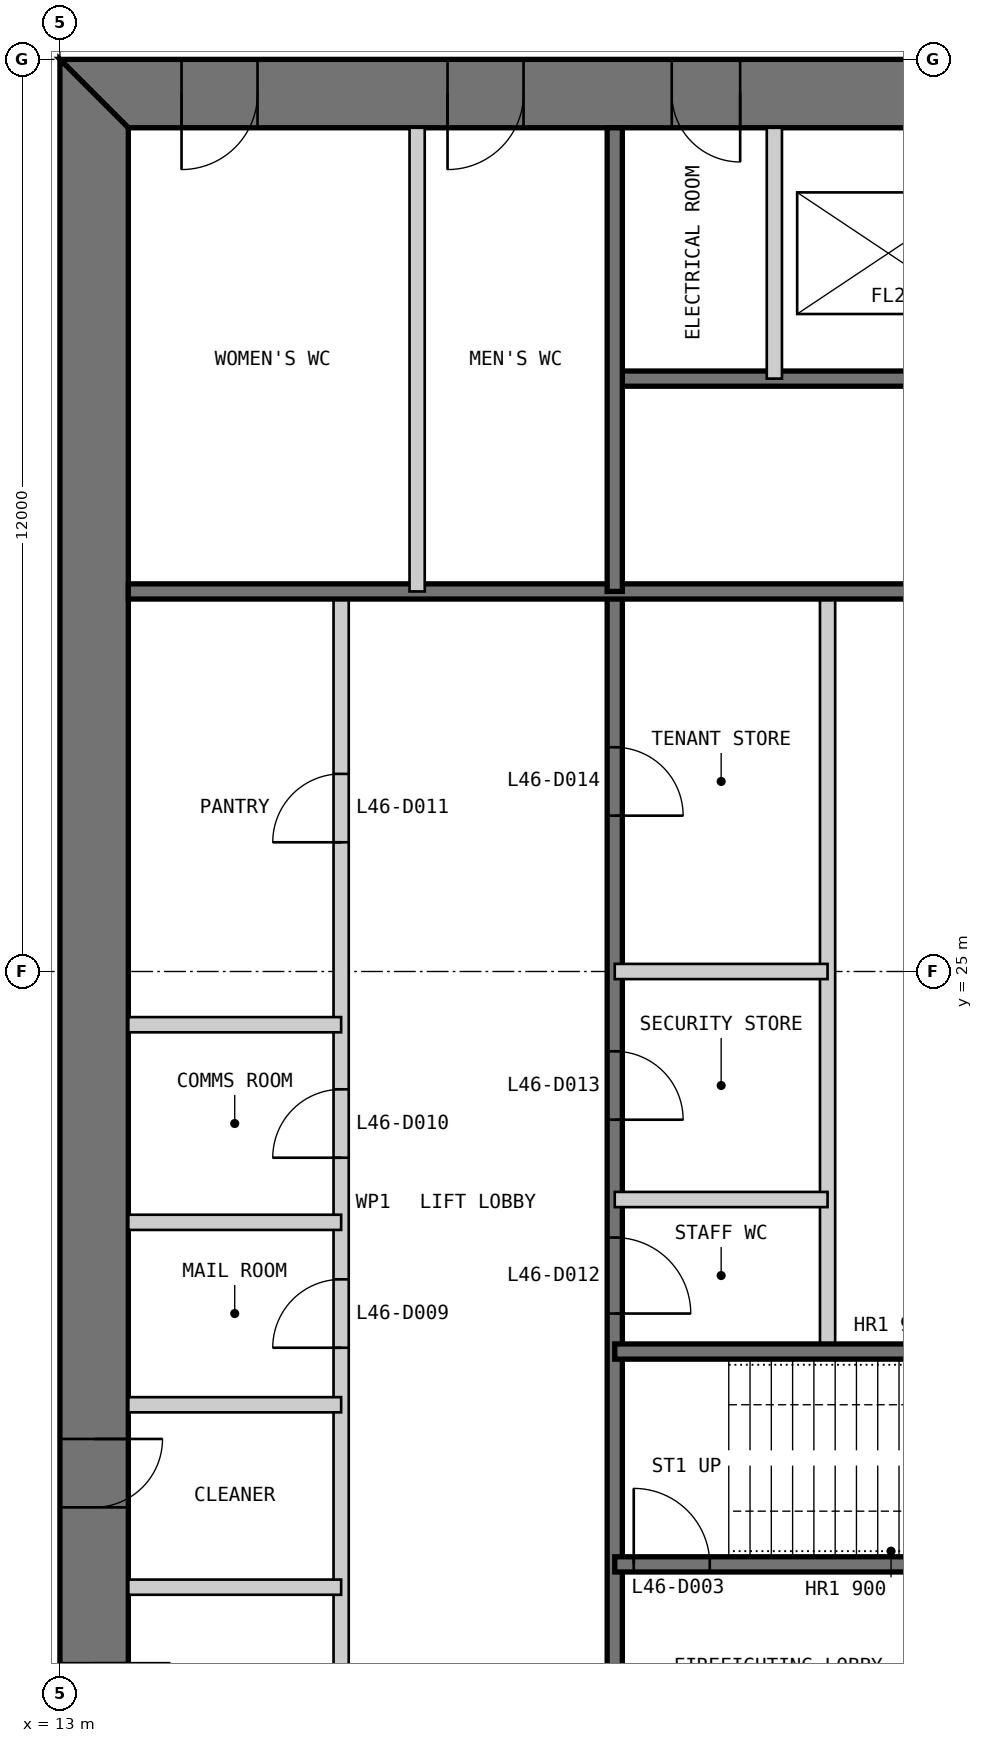
"""IFC4 building model, lengths in metres.
Left out: names, types, materials, properties, quantities, classifications, styles, units other than length and angle.
Written with IfcOpenShell. Run it as: python <this file> out.ifc"""

import sys

from ifc_helpers import new_model, si_unit, direction, frame, frame_2d, origin, place, context, subcontext, project, spatial, polyline, rectangle, outline, extrude, element, fill, save


model = new_model("IFC4")
c1 = context("Model", 3, precision=1e-05, world=origin(), true_north=direction((0.0, 1.0)))
c2 = subcontext(c1, "Body", "Model", "MODEL_VIEW")
j1 = project(units=[si_unit("LENGTHUNIT", "METRE"), si_unit("PLANEANGLEUNIT", "RADIAN")], contexts=[c1])
p1 = place(None, origin())
s1 = spatial("IfcSite", under=j1, at=p1, CompositionType="ELEMENT")
p2 = place(p1, origin())
s2 = spatial("IfcBuilding", under=s1, at=p2, CompositionType="ELEMENT")
p3 = place(p2, frame((0.0, 0.0, 197.8)))
s3 = spatial("IfcBuildingStorey", under=s2, at=p3, CompositionType="ELEMENT", Elevation=197.8)
p4 = place(p3, frame((37.0, 36.55, 0.0), z_axis=(0.0, 0.0, 1.0), x_axis=(-1.0, 0.0, 0.0)))
e1 = element("IfcWall", 1, at=p4, inside=s3, PredefinedType="SHEAR", context=c2, shape_type="SweptSolid", body=[
    extrude(outline(polyline([(0.0, -0.45), (24.0, -0.45), (23.1, 0.45), (0.9, 0.45), (0.0, -0.45)])), origin(), (0.0, 0.0, 1.0), 4.0),
])
p5 = place(p4, frame((4.9, 0.0, 0.0)))
e2 = element("IfcOpeningElement", 2, at=p5, cuts=e1, PredefinedType="OPENING", context=c2, shape_type="SweptSolid", body=[
    extrude(rectangle(XDim=1.0, YDim=2.2, at=frame_2d((0.5, 1.1))), frame((0.0, 0.46, 0.0), z_axis=(0.0, -1.0, 0.0), x_axis=(1.0, 0.0, 0.0)), (0.0, 0.0, 1.0), 0.92),
])
p6 = place(p4, frame((8.9, 0.0, 0.0)))
e3 = element("IfcOpeningElement", 3, at=p6, cuts=e1, PredefinedType="OPENING", context=c2, shape_type="SweptSolid", body=[
    extrude(rectangle(XDim=1.1, YDim=2.2, at=frame_2d((0.55, 1.1))), frame((0.0, 0.46, 0.0), z_axis=(0.0, -1.0, 0.0), x_axis=(1.0, 0.0, 0.0)), (0.0, 0.0, 1.0), 0.92),
])
p7 = place(p4, frame((15.05, 0.0, 0.0)))
e4 = element("IfcOpeningElement", 4, at=p7, cuts=e1, PredefinedType="OPENING", context=c2, shape_type="SweptSolid", body=[
    extrude(rectangle(XDim=0.9, YDim=2.2, at=frame_2d((0.45, 1.1))), frame((0.0, 0.46, 0.0), z_axis=(0.0, -1.0, 0.0), x_axis=(1.0, 0.0, 0.0)), (0.0, 0.0, 1.0), 0.92),
])
p8 = place(p4, frame((17.9, 0.0, 0.0)))
e5 = element("IfcOpeningElement", 5, at=p8, cuts=e1, PredefinedType="OPENING", context=c2, shape_type="SweptSolid", body=[
    extrude(rectangle(XDim=1.0, YDim=2.2, at=frame_2d((0.5, 1.1))), frame((0.0, 0.46, 0.0), z_axis=(0.0, -1.0, 0.0), x_axis=(1.0, 0.0, 0.0)), (0.0, 0.0, 1.0), 0.92),
])
p9 = place(p4, frame((21.4, 0.0, 0.0)))
e6 = element("IfcOpeningElement", 6, at=p9, cuts=e1, PredefinedType="OPENING", context=c2, shape_type="SweptSolid", body=[
    extrude(rectangle(XDim=1.0, YDim=2.2, at=frame_2d((0.5, 1.1))), frame((0.0, 0.46, 0.0), z_axis=(0.0, -1.0, 0.0), x_axis=(1.0, 0.0, 0.0)), (0.0, 0.0, 1.0), 0.92),
])
p10 = place(p3, frame((13.45, 36.1, 0.0), z_axis=(0.0, 0.0, 1.0), x_axis=(0.0, -1.0, 0.0)))
e7 = element("IfcWall", 7, at=p10, inside=s3, PredefinedType="SHEAR", context=c2, shape_type="SweptSolid", body=[
    extrude(outline(polyline([(-0.9, -0.45), (23.1, -0.45), (22.2, 0.45), (0.0, 0.45), (-0.9, -0.45)])), origin(), (0.0, 0.0, 1.0), 4.0),
])
p11 = place(p10, frame((20.2, 0.0, 0.0)))
e8 = element("IfcOpeningElement", 8, at=p11, cuts=e7, PredefinedType="OPENING", context=c2, shape_type="SweptSolid", body=[
    extrude(rectangle(XDim=1.0, YDim=2.2, at=frame_2d((0.5, 1.1))), frame((0.0, 0.46, 0.0), z_axis=(0.0, -1.0, 0.0), x_axis=(1.0, 0.0, 0.0)), (0.0, 0.0, 1.0), 0.92),
])
p12 = place(p10, frame((17.25, 0.0, 0.0)))
e9 = element("IfcOpeningElement", 9, at=p12, cuts=e7, PredefinedType="OPENING", context=c2, shape_type="SweptSolid", body=[
    extrude(rectangle(XDim=0.9, YDim=2.2, at=frame_2d((0.45, 1.1))), frame((0.0, 0.46, 0.0), z_axis=(0.0, -1.0, 0.0), x_axis=(1.0, 0.0, 0.0)), (0.0, 0.0, 1.0), 0.92),
])
p13 = place(p3, frame((16.7, 13.9, 0.0), z_axis=(0.0, 0.0, 1.0), x_axis=(0.0, 1.0, 0.0)))
e10 = element("IfcWall", 10, at=p13, inside=s3, PredefinedType="PARTITIONING", context=c2, shape_type="SweptSolid", body=[
    extrude(rectangle(XDim=16.1, YDim=0.2, at=frame_2d((8.05, 0.0))), origin(), (0.0, 0.0, 1.0), 3.8),
])
p14 = place(p13, frame((6.15, 0.0, 0.0)))
e11 = element("IfcOpeningElement", 11, at=p14, cuts=e10, PredefinedType="OPENING", context=c2, shape_type="SweptSolid", body=[
    extrude(rectangle(XDim=0.9, YDim=2.2, at=frame_2d((0.45, 1.1))), frame((0.0, 0.11, 0.0), z_axis=(0.0, -1.0, 0.0), x_axis=(1.0, 0.0, 0.0)), (0.0, 0.0, 1.0), 0.22),
])
p15 = place(p13, frame((8.65, 0.0, 0.0)))
e12 = element("IfcOpeningElement", 12, at=p15, cuts=e10, PredefinedType="OPENING", context=c2, shape_type="SweptSolid", body=[
    extrude(rectangle(XDim=0.9, YDim=2.2, at=frame_2d((0.45, 1.1))), frame((0.0, 0.11, 0.0), z_axis=(0.0, -1.0, 0.0), x_axis=(1.0, 0.0, 0.0)), (0.0, 0.0, 1.0), 0.22),
])
p16 = place(p13, frame((12.8, 0.0, 0.0)))
e13 = element("IfcOpeningElement", 13, at=p16, cuts=e10, PredefinedType="OPENING", context=c2, shape_type="SweptSolid", body=[
    extrude(rectangle(XDim=0.9, YDim=2.2, at=frame_2d((0.45, 1.1))), frame((0.0, 0.11, 0.0), z_axis=(0.0, -1.0, 0.0), x_axis=(1.0, 0.0, 0.0)), (0.0, 0.0, 1.0), 0.22),
])
p17 = place(p3, frame((20.3, 13.9, 0.0), z_axis=(0.0, 0.0, 1.0), x_axis=(0.0, 1.0, 0.0)))
e14 = element("IfcWall", 14, at=p17, inside=s3, PredefinedType="SOLIDWALL", context=c2, shape_type="SweptSolid", body=[
    extrude(rectangle(XDim=16.1, YDim=0.2, at=frame_2d((8.05, 0.0))), origin(), (0.0, 0.0, 1.0), 3.8),
])
p18 = place(p17, frame((6.6, 0.0, 0.0)))
e15 = element("IfcOpeningElement", 15, at=p18, cuts=e14, PredefinedType="OPENING", context=c2, shape_type="SweptSolid", body=[
    extrude(rectangle(XDim=1.0, YDim=2.2, at=frame_2d((0.5, 1.1))), frame((0.0, 0.11, 0.0), z_axis=(0.0, -1.0, 0.0), x_axis=(1.0, 0.0, 0.0)), (0.0, 0.0, 1.0), 0.22),
])
p19 = place(p17, frame((9.15, 0.0, 0.0)))
e16 = element("IfcOpeningElement", 16, at=p19, cuts=e14, PredefinedType="OPENING", context=c2, shape_type="SweptSolid", body=[
    extrude(rectangle(XDim=0.9, YDim=2.2, at=frame_2d((0.45, 1.1))), frame((0.0, 0.11, 0.0), z_axis=(0.0, -1.0, 0.0), x_axis=(1.0, 0.0, 0.0)), (0.0, 0.0, 1.0), 0.22),
])
p20 = place(p17, frame((13.15, 0.0, 0.0)))
e17 = element("IfcOpeningElement", 17, at=p20, cuts=e14, PredefinedType="OPENING", context=c2, shape_type="SweptSolid", body=[
    extrude(rectangle(XDim=0.9, YDim=2.2, at=frame_2d((0.45, 1.1))), frame((0.0, 0.11, 0.0), z_axis=(0.0, -1.0, 0.0), x_axis=(1.0, 0.0, 0.0)), (0.0, 0.0, 1.0), 0.22),
])
p21 = place(p3, frame((23.1, 20.0, 0.0), z_axis=(0.0, 0.0, 1.0), x_axis=(0.0, 1.0, 0.0)))
e18 = element("IfcWall", 18, at=p21, inside=s3, PredefinedType="PARTITIONING", context=c2, shape_type="SweptSolid", body=[
    extrude(rectangle(XDim=10.0, YDim=0.2, at=frame_2d((5.0, 0.0))), origin(), (0.0, 0.0, 1.0), 3.8),
])
p22 = place(p3, frame((20.3, 17.2, 0.0), z_axis=(0.0, 0.0, 1.0), x_axis=(1.0, 0.0, 0.0)))
e19 = element("IfcWall", 19, at=p22, inside=s3, PredefinedType="SOLIDWALL", context=c2, shape_type="SweptSolid", body=[
    extrude(rectangle(XDim=9.4, YDim=0.2, at=frame_2d((4.7, 0.0))), origin(), (0.0, 0.0, 1.0), 3.8),
])
p23 = place(p22, frame((0.25, 0.0, 0.0)))
e20 = element("IfcOpeningElement", 20, at=p23, cuts=e19, PredefinedType="OPENING", context=c2, shape_type="SweptSolid", body=[
    extrude(rectangle(XDim=1.0, YDim=2.2, at=frame_2d((0.5, 1.1))), frame((0.0, 0.11, 0.0), z_axis=(0.0, -1.0, 0.0), x_axis=(1.0, 0.0, 0.0)), (0.0, 0.0, 1.0), 0.22),
])
p24 = place(p3, frame((20.3, 20.0, 0.0), z_axis=(0.0, 0.0, 1.0), x_axis=(1.0, 0.0, 0.0)))
e21 = element("IfcWall", 21, at=p24, inside=s3, PredefinedType="SOLIDWALL", context=c2, shape_type="SweptSolid", body=[
    extrude(rectangle(XDim=15.8, YDim=0.2, at=frame_2d((7.9, 0.0))), origin(), (0.0, 0.0, 1.0), 3.8),
])
for number, where, z_axis, x_axis in (
    (22, (13.9, 16.9, 0.0), (0.0, 0.0, 1.0), (1.0, 0.0, 0.0)),
    (23, (13.9, 19.3, 0.0), (0.0, 0.0, 1.0), (1.0, 0.0, 0.0)),
    (24, (13.9, 21.7, 0.0), (0.0, 0.0, 1.0), (1.0, 0.0, 0.0)),
    (25, (13.9, 24.3, 0.0), (0.0, 0.0, 1.0), (1.0, 0.0, 0.0)),
    (26, (20.3, 22.0, 0.0), (0.0, 0.0, 1.0), (1.0, 0.0, 0.0)),
    (27, (20.3, 25.0, 0.0), (0.0, 0.0, 1.0), (1.0, 0.0, 0.0)),
):
    element("IfcWall", number, at=place(p3, frame(where, z_axis=z_axis, x_axis=x_axis)), inside=s3, PredefinedType="PARTITIONING", context=c2, shape_type="SweptSolid", body=[
        extrude(rectangle(XDim=2.8, YDim=0.2, at=frame_2d((1.4, 0.0))), origin(), (0.0, 0.0, 1.0), 3.8),
    ])
p25 = place(p3, frame((29.7, 32.8, 0.0), z_axis=(0.0, 0.0, 1.0), x_axis=(-1.0, 0.0, 0.0)))
e28 = element("IfcWall", 28, at=p25, inside=s3, PredefinedType="SOLIDWALL", context=c2, shape_type="SweptSolid", body=[
    extrude(rectangle(XDim=9.4, YDim=0.2, at=frame_2d((4.7, 0.0))), origin(), (0.0, 0.0, 1.0), 3.8),
])
p26 = place(p25, frame((0.25, 0.0, 0.0)))
e29 = element("IfcOpeningElement", 29, at=p26, cuts=e28, PredefinedType="OPENING", context=c2, shape_type="SweptSolid", body=[
    extrude(rectangle(XDim=1.0, YDim=2.2, at=frame_2d((0.5, 1.1))), frame((0.0, 0.11, 0.0), z_axis=(0.0, -1.0, 0.0), x_axis=(1.0, 0.0, 0.0)), (0.0, 0.0, 1.0), 0.22),
])
p27 = place(p3, frame((29.7, 30.0, 0.0), z_axis=(0.0, 0.0, 1.0), x_axis=(-1.0, 0.0, 0.0)))
e30 = element("IfcWall", 30, at=p27, inside=s3, PredefinedType="SOLIDWALL", context=c2, shape_type="SweptSolid", body=[
    extrude(rectangle(XDim=15.8, YDim=0.2, at=frame_2d((7.9, 0.0))), origin(), (0.0, 0.0, 1.0), 3.8),
])
p28 = place(p3, frame((22.4, 36.1, 0.0), z_axis=(0.0, 0.0, 1.0), x_axis=(0.0, -1.0, 0.0)))
e31 = element("IfcWall", 31, at=p28, inside=s3, PredefinedType="PARTITIONING", context=c2, shape_type="SweptSolid", body=[
    extrude(rectangle(XDim=3.3, YDim=0.2, at=frame_2d((1.65, 0.0))), origin(), (0.0, 0.0, 1.0), 3.8),
])
p29 = place(p3, frame((20.3, 36.1, 0.0), z_axis=(0.0, 0.0, 1.0), x_axis=(0.0, -1.0, 0.0)))
e32 = element("IfcWall", 32, at=p29, inside=s3, PredefinedType="SOLIDWALL", context=c2, shape_type="SweptSolid", body=[
    extrude(rectangle(XDim=6.1, YDim=0.2, at=frame_2d((3.05, 0.0))), origin(), (0.0, 0.0, 1.0), 3.8),
])
p30 = place(p3, frame((17.7, 36.1, 0.0), z_axis=(0.0, 0.0, 1.0), x_axis=(0.0, -1.0, 0.0)))
e33 = element("IfcWall", 33, at=p30, inside=s3, PredefinedType="PARTITIONING", context=c2, shape_type="SweptSolid", body=[
    extrude(rectangle(XDim=6.1, YDim=0.2, at=frame_2d((3.05, 0.0))), origin(), (0.0, 0.0, 1.0), 3.8),
])
p31 = place(p23, origin())
e34 = element("IfcDoor", 34, at=p31, inside=s3, OperationType="SINGLE_SWING_LEFT", PredefinedType="DOOR", context=c2, shape_type="SweptSolid", body=[
    extrude(rectangle(XDim=1.0, YDim=2.2, at=frame_2d((0.5, 1.1))), frame((0.0, 0.025, 0.0), z_axis=(0.0, -1.0, 0.0), x_axis=(1.0, 0.0, 0.0)), (0.0, 0.0, 1.0), 0.05),
])
fill(e20, e34)
p32 = place(p11, origin())
e35 = element("IfcDoor", 35, at=p32, inside=s3, OperationType="SINGLE_SWING_LEFT", PredefinedType="DOOR", context=c2, shape_type="SweptSolid", body=[
    extrude(rectangle(XDim=1.0, YDim=2.2, at=frame_2d((0.5, 1.1))), frame((0.0, 0.025, 0.0), z_axis=(0.0, -1.0, 0.0), x_axis=(1.0, 0.0, 0.0)), (0.0, 0.0, 1.0), 0.05),
    extrude(outline(polyline([(0.0, 0.0), (0.04, 0.0), (0.04, 2.16), (0.96, 2.16), (0.96, 0.0), (1.0, 0.0), (1.0, 2.2), (0.0, 2.2), (0.0, 0.0)])), frame((0.0, 0.3, 0.0), z_axis=(0.0, -1.0, 0.0), x_axis=(1.0, 0.0, 0.0)), (0.0, 0.0, 1.0), 0.6),
])
fill(e8, e35)
p33 = place(p12, origin())
e36 = element("IfcDoor", 36, at=p33, inside=s3, OperationType="SINGLE_SWING_LEFT", PredefinedType="DOOR", context=c2, shape_type="SweptSolid", body=[
    extrude(rectangle(XDim=0.9, YDim=2.2, at=frame_2d((0.45, 1.1))), frame((0.0, 0.025, 0.0), z_axis=(0.0, -1.0, 0.0), x_axis=(1.0, 0.0, 0.0)), (0.0, 0.0, 1.0), 0.05),
    extrude(outline(polyline([(0.0, 0.0), (0.04, 0.0), (0.04, 2.16), (0.86, 2.16), (0.86, 0.0), (0.9, 0.0), (0.9, 2.2), (0.0, 2.2), (0.0, 0.0)])), frame((0.0, 0.3, 0.0), z_axis=(0.0, -1.0, 0.0), x_axis=(1.0, 0.0, 0.0)), (0.0, 0.0, 1.0), 0.6),
])
fill(e9, e36)
p34 = place(p14, origin())
e37 = element("IfcDoor", 37, at=p34, inside=s3, OperationType="SINGLE_SWING_LEFT", PredefinedType="DOOR", context=c2, shape_type="SweptSolid", body=[
    extrude(rectangle(XDim=0.9, YDim=2.2, at=frame_2d((0.45, 1.1))), frame((0.0, 0.025, 0.0), z_axis=(0.0, -1.0, 0.0), x_axis=(1.0, 0.0, 0.0)), (0.0, 0.0, 1.0), 0.05),
])
fill(e11, e37)
p35 = place(p15, origin())
e38 = element("IfcDoor", 38, at=p35, inside=s3, OperationType="SINGLE_SWING_LEFT", PredefinedType="DOOR", context=c2, shape_type="SweptSolid", body=[
    extrude(rectangle(XDim=0.9, YDim=2.2, at=frame_2d((0.45, 1.1))), frame((0.0, 0.025, 0.0), z_axis=(0.0, -1.0, 0.0), x_axis=(1.0, 0.0, 0.0)), (0.0, 0.0, 1.0), 0.05),
])
fill(e12, e38)
p36 = place(p16, origin())
e39 = element("IfcDoor", 39, at=p36, inside=s3, OperationType="SINGLE_SWING_LEFT", PredefinedType="DOOR", context=c2, shape_type="SweptSolid", body=[
    extrude(rectangle(XDim=0.9, YDim=2.2, at=frame_2d((0.45, 1.1))), frame((0.0, 0.025, 0.0), z_axis=(0.0, -1.0, 0.0), x_axis=(1.0, 0.0, 0.0)), (0.0, 0.0, 1.0), 0.05),
])
fill(e13, e39)
p37 = place(p18, frame((1.0, 0.0, 0.0), z_axis=(0.0, 0.0, 1.0), x_axis=(-1.0, 0.0, 0.0)))
e40 = element("IfcDoor", 40, at=p37, inside=s3, OperationType="SINGLE_SWING_RIGHT", PredefinedType="DOOR", context=c2, shape_type="SweptSolid", body=[
    extrude(rectangle(XDim=1.0, YDim=2.2, at=frame_2d((0.5, 1.1))), frame((0.0, 0.025, 0.0), z_axis=(0.0, -1.0, 0.0), x_axis=(1.0, 0.0, 0.0)), (0.0, 0.0, 1.0), 0.05),
])
fill(e15, e40)
p38 = place(p19, frame((0.9, 0.0, 0.0), z_axis=(0.0, 0.0, 1.0), x_axis=(-1.0, 0.0, 0.0)))
e41 = element("IfcDoor", 41, at=p38, inside=s3, OperationType="SINGLE_SWING_RIGHT", PredefinedType="DOOR", context=c2, shape_type="SweptSolid", body=[
    extrude(rectangle(XDim=0.9, YDim=2.2, at=frame_2d((0.45, 1.1))), frame((0.0, 0.025, 0.0), z_axis=(0.0, -1.0, 0.0), x_axis=(1.0, 0.0, 0.0)), (0.0, 0.0, 1.0), 0.05),
])
fill(e16, e41)
p39 = place(p20, frame((0.9, 0.0, 0.0), z_axis=(0.0, 0.0, 1.0), x_axis=(-1.0, 0.0, 0.0)))
e42 = element("IfcDoor", 42, at=p39, inside=s3, OperationType="SINGLE_SWING_RIGHT", PredefinedType="DOOR", context=c2, shape_type="SweptSolid", body=[
    extrude(rectangle(XDim=0.9, YDim=2.2, at=frame_2d((0.45, 1.1))), frame((0.0, 0.025, 0.0), z_axis=(0.0, -1.0, 0.0), x_axis=(1.0, 0.0, 0.0)), (0.0, 0.0, 1.0), 0.05),
])
fill(e17, e42)
p40 = place(p7, origin())
e43 = element("IfcDoor", 43, at=p40, inside=s3, OperationType="SINGLE_SWING_LEFT", PredefinedType="DOOR", context=c2, shape_type="SweptSolid", body=[
    extrude(rectangle(XDim=0.9, YDim=2.2, at=frame_2d((0.45, 1.1))), frame((0.0, 0.025, 0.0), z_axis=(0.0, -1.0, 0.0), x_axis=(1.0, 0.0, 0.0)), (0.0, 0.0, 1.0), 0.05),
    extrude(outline(polyline([(0.0, 0.0), (0.04, 0.0), (0.04, 2.16), (0.86, 2.16), (0.86, 0.0), (0.9, 0.0), (0.9, 2.2), (0.0, 2.2), (0.0, 0.0)])), frame((0.0, 0.3, 0.0), z_axis=(0.0, -1.0, 0.0), x_axis=(1.0, 0.0, 0.0)), (0.0, 0.0, 1.0), 0.6),
])
fill(e4, e43)
p41 = place(p8, origin())
e44 = element("IfcDoor", 44, at=p41, inside=s3, OperationType="SINGLE_SWING_RIGHT", PredefinedType="DOOR", context=c2, shape_type="SweptSolid", body=[
    extrude(rectangle(XDim=1.0, YDim=2.2, at=frame_2d((0.5, 1.1))), frame((0.0, 0.025, 0.0), z_axis=(0.0, -1.0, 0.0), x_axis=(1.0, 0.0, 0.0)), (0.0, 0.0, 1.0), 0.05),
    extrude(outline(polyline([(0.0, 0.0), (0.04, 0.0), (0.04, 2.16), (0.96, 2.16), (0.96, 0.0), (1.0, 0.0), (1.0, 2.2), (0.0, 2.2), (0.0, 0.0)])), frame((0.0, 0.3, 0.0), z_axis=(0.0, -1.0, 0.0), x_axis=(1.0, 0.0, 0.0)), (0.0, 0.0, 1.0), 0.6),
])
fill(e5, e44)
p42 = place(p9, origin())
e45 = element("IfcDoor", 45, at=p42, inside=s3, OperationType="SINGLE_SWING_RIGHT", PredefinedType="DOOR", context=c2, shape_type="SweptSolid", body=[
    extrude(rectangle(XDim=1.0, YDim=2.2, at=frame_2d((0.5, 1.1))), frame((0.0, 0.025, 0.0), z_axis=(0.0, -1.0, 0.0), x_axis=(1.0, 0.0, 0.0)), (0.0, 0.0, 1.0), 0.05),
    extrude(outline(polyline([(0.0, 0.0), (0.04, 0.0), (0.04, 2.16), (0.96, 2.16), (0.96, 0.0), (1.0, 0.0), (1.0, 2.2), (0.0, 2.2), (0.0, 0.0)])), frame((0.0, 0.3, 0.0), z_axis=(0.0, -1.0, 0.0), x_axis=(1.0, 0.0, 0.0)), (0.0, 0.0, 1.0), 0.6),
])
fill(e6, e45)
save(model, sys.argv[1])
